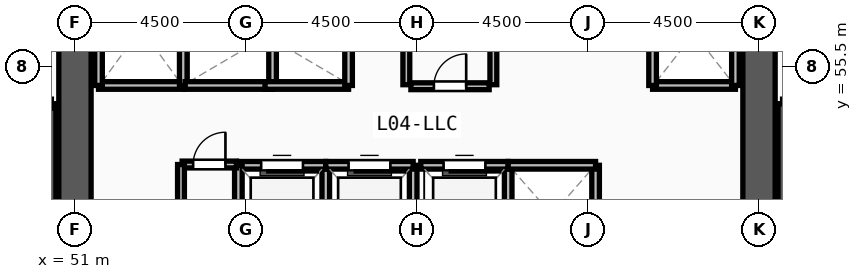
"""IFC4 building model, lengths in metres.
Left out: names, types, materials, properties, quantities, classifications, styles, units other than length and angle.
Written with IfcOpenShell. Run it as: python <this file> out.ifc"""

import sys

from ifc_helpers import new_model, si_unit, direction, frame, frame_2d, origin, place, context, subcontext, project, spatial, rectangle, extrude, source, transform, mapped, element, fill, save


model = new_model("IFC4")
c1 = context("Model", 3, precision=1e-05, world=origin(), true_north=direction((0.0, 1.0)))
c2 = subcontext(c1, "Body", "Model", "MODEL_VIEW")
j1 = project(units=[si_unit("LENGTHUNIT", "METRE"), si_unit("PLANEANGLEUNIT", "RADIAN")], contexts=[c1])
p1 = place(None, origin())
s1 = spatial("IfcSite", under=j1, at=p1, CompositionType="ELEMENT")
p2 = place(p1, origin())
s2 = spatial("IfcBuilding", under=s1, at=p2, CompositionType="ELEMENT")
p3 = place(p2, frame((0.0, 0.0, 14.4)))
s3 = spatial("IfcBuildingStorey", under=s2, at=p3, CompositionType="ELEMENT", Elevation=14.4)
p4 = place(p3, frame((69.0, 60.6, 0.0), z_axis=(0.0, 0.0, 1.0), x_axis=(0.0, -1.0, 0.0)))
e1 = element("IfcWall", 1, at=p4, inside=s3, PredefinedType="SHEAR", context=c2, shape_type="SweptSolid", body=[
    extrude(rectangle(XDim=13.2, YDim=0.85, at=frame_2d((6.6, 0.0))), origin(), (0.0, 0.0, 1.0), 4.25),
])
m1 = source(origin(), c2, "Body", "SweptSolid", [
    extrude(rectangle(XDim=1.2, YDim=2.2, at=frame_2d((0.6, 1.1))), frame((0.0, 0.435, 0.0), z_axis=(0.0, -1.0, 0.0), x_axis=(1.0, 0.0, 0.0)), (0.0, 0.0, 1.0), 0.87),
])
p5 = place(p4, frame((1.05, 0.0, 0.0)))
e2 = element("IfcOpeningElement", 2, at=p5, cuts=e1, PredefinedType="OPENING", context=c2, shape_type="MappedRepresentation", body=[
    mapped(m1, transform((0.0, 0.0, 0.0), x_axis=(1.0, 0.0, 0.0), y_axis=(0.0, 1.0, 0.0), z_axis=(0.0, 0.0, 1.0), scale=1.0)),
])
p6 = place(p3, frame((51.0, 47.4, 0.0), z_axis=(0.0, 0.0, 1.0), x_axis=(0.0, 1.0, 0.0)))
e3 = element("IfcWall", 3, at=p6, inside=s3, PredefinedType="SHEAR", context=c2, shape_type="SweptSolid", body=[
    extrude(rectangle(XDim=13.2, YDim=0.85, at=frame_2d((6.6, 0.0))), origin(), (0.0, 0.0, 1.0), 4.25),
])
for number, where, z_axis, x_axis in (
    (4, (50.38, 46.7, 0.0), (0.0, 0.0, 1.0), (0.0, 1.0, 0.0)),
    (5, (69.62, 54.52, 0.0), (0.0, 0.0, 1.0), (0.0, -1.0, 0.0)),
):
    element("IfcWall", number, at=place(p3, frame(where, z_axis=z_axis, x_axis=x_axis)), inside=s3, PredefinedType="SOLIDWALL", context=c2, shape_type="SweptSolid", body=[
        extrude(rectangle(XDim=7.82, YDim=0.24, at=frame_2d((3.91, 0.0))), origin(), (0.0, 0.0, 1.0), 4.25),
    ])
p7 = place(p3, frame((51.62, 55.0, 0.0), z_axis=(0.0, 0.0, 1.0), x_axis=(1.0, 0.0, 0.0)))
e6 = element("IfcWall", 6, at=p7, inside=s3, PredefinedType="SOLIDWALL", context=c2, shape_type="SweptSolid", body=[
    extrude(rectangle(XDim=2.23, YDim=0.2, at=frame_2d((1.115, 0.0))), origin(), (0.0, 0.0, 1.0), 4.25),
])
for number, where, z_axis, x_axis in (
    (7, (53.85, 55.0, 0.0), (0.0, 0.0, 1.0), (0.0, 1.0, 0.0)),
    (8, (51.62, 58.0, 0.0), (0.0, 0.0, 1.0), (0.0, -1.0, 0.0)),
):
    element("IfcWall", number, at=place(p3, frame(where, z_axis=z_axis, x_axis=x_axis)), inside=s3, PredefinedType="SOLIDWALL", context=c2, shape_type="SweptSolid", body=[
        extrude(rectangle(XDim=3.0, YDim=0.2, at=frame_2d((1.5, 0.0))), origin(), (0.0, 0.0, 1.0), 4.25),
    ])
p8 = place(p3, frame((66.2, 55.0, 0.0), z_axis=(0.0, 0.0, 1.0), x_axis=(1.0, 0.0, 0.0)))
e9 = element("IfcWall", 9, at=p8, inside=s3, PredefinedType="SOLIDWALL", context=c2, shape_type="SweptSolid", body=[
    extrude(rectangle(XDim=2.18, YDim=0.2, at=frame_2d((1.09, 0.0))), origin(), (0.0, 0.0, 1.0), 4.25),
])
for number, where, z_axis, x_axis in (
    (10, (68.38, 55.0, 0.0), (0.0, 0.0, 1.0), (0.0, 1.0, 0.0)),
    (11, (66.2, 57.75, 0.0), (0.0, 0.0, 1.0), (0.0, -1.0, 0.0)),
):
    element("IfcWall", number, at=place(p3, frame(where, z_axis=z_axis, x_axis=x_axis)), inside=s3, PredefinedType="SOLIDWALL", context=c2, shape_type="SweptSolid", body=[
        extrude(rectangle(XDim=2.75, YDim=0.2, at=frame_2d((1.375, 0.0))), origin(), (0.0, 0.0, 1.0), 4.25),
    ])
p9 = place(p3, frame((57.6, 50.3, 0.0), z_axis=(0.0, 0.0, 1.0), x_axis=(0.0, 1.0, 0.0)))
e12 = element("IfcWall", 12, at=p9, inside=s3, PredefinedType="SOLIDWALL", context=c2, shape_type="SweptSolid", body=[
    extrude(rectangle(XDim=2.6, YDim=0.2, at=frame_2d((1.3, 0.0))), origin(), (0.0, 0.0, 1.0), 4.25),
])
p10 = place(p3, frame((57.6, 52.9, 0.0), z_axis=(0.0, 0.0, 1.0), x_axis=(-1.0, 0.0, 0.0)))
e13 = element("IfcWall", 13, at=p10, inside=s3, PredefinedType="SOLIDWALL", context=c2, shape_type="SweptSolid", body=[
    extrude(rectangle(XDim=2.3, YDim=0.2, at=frame_2d((1.15, 0.0))), origin(), (0.0, 0.0, 1.0), 4.25),
])
m2 = source(origin(), c2, "Body", "SweptSolid", [
    extrude(rectangle(XDim=1.1, YDim=2.2, at=frame_2d((0.55, 1.1))), frame((0.0, 0.11, 0.0), z_axis=(0.0, -1.0, 0.0), x_axis=(1.0, 0.0, 0.0)), (0.0, 0.0, 1.0), 0.22),
])
p11 = place(p10, frame((0.6, 0.0, 0.0)))
e14 = element("IfcOpeningElement", 14, at=p11, cuts=e13, PredefinedType="OPENING", context=c2, shape_type="MappedRepresentation", body=[
    mapped(m2, transform((0.0, 0.0, 0.0), x_axis=(1.0, 0.0, 0.0), y_axis=(0.0, 1.0, 0.0), z_axis=(0.0, 0.0, 1.0), scale=1.0)),
])
for number, where, z_axis, x_axis in (
    (15, (55.3, 52.9, 0.0), (0.0, 0.0, 1.0), (0.0, -1.0, 0.0)),
    (16, (59.9, 50.3, 0.0), (0.0, 0.0, 1.0), (0.0, 1.0, 0.0)),
):
    element("IfcWall", number, at=place(p3, frame(where, z_axis=z_axis, x_axis=x_axis)), inside=s3, PredefinedType="SOLIDWALL", context=c2, shape_type="SweptSolid", body=[
        extrude(rectangle(XDim=2.6, YDim=0.2, at=frame_2d((1.3, 0.0))), origin(), (0.0, 0.0, 1.0), 4.25),
    ])
p12 = place(p3, frame((59.9, 52.9, 0.0), z_axis=(0.0, 0.0, 1.0), x_axis=(-1.0, 0.0, 0.0)))
e17 = element("IfcWall", 17, at=p12, inside=s3, PredefinedType="SOLIDWALL", context=c2, shape_type="SweptSolid", body=[
    extrude(rectangle(XDim=2.3, YDim=0.2, at=frame_2d((1.15, 0.0))), origin(), (0.0, 0.0, 1.0), 4.25),
])
p13 = place(p12, frame((0.6, 0.0, 0.0)))
e18 = element("IfcOpeningElement", 18, at=p13, cuts=e17, PredefinedType="OPENING", context=c2, shape_type="MappedRepresentation", body=[
    mapped(m2, transform((0.0, 0.0, 0.0), x_axis=(1.0, 0.0, 0.0), y_axis=(0.0, 1.0, 0.0), z_axis=(0.0, 0.0, 1.0), scale=1.0)),
])
p14 = place(p3, frame((62.4, 50.3, 0.0), z_axis=(0.0, 0.0, 1.0), x_axis=(0.0, 1.0, 0.0)))
e19 = element("IfcWall", 19, at=p14, inside=s3, PredefinedType="SOLIDWALL", context=c2, shape_type="SweptSolid", body=[
    extrude(rectangle(XDim=2.6, YDim=0.2, at=frame_2d((1.3, 0.0))), origin(), (0.0, 0.0, 1.0), 4.25),
])
p15 = place(p3, frame((62.4, 52.9, 0.0), z_axis=(0.0, 0.0, 1.0), x_axis=(-1.0, 0.0, 0.0)))
e20 = element("IfcWall", 20, at=p15, inside=s3, PredefinedType="SOLIDWALL", context=c2, shape_type="SweptSolid", body=[
    extrude(rectangle(XDim=2.3, YDim=0.2, at=frame_2d((1.15, 0.0))), origin(), (0.0, 0.0, 1.0), 4.25),
])
p16 = place(p15, frame((0.6, 0.0, 0.0)))
e21 = element("IfcOpeningElement", 21, at=p16, cuts=e20, PredefinedType="OPENING", context=c2, shape_type="MappedRepresentation", body=[
    mapped(m2, transform((0.0, 0.0, 0.0), x_axis=(1.0, 0.0, 0.0), y_axis=(0.0, 1.0, 0.0), z_axis=(0.0, 0.0, 1.0), scale=1.0)),
])
p17 = place(p3, frame((64.7, 50.3, 0.0), z_axis=(0.0, 0.0, 1.0), x_axis=(0.0, 1.0, 0.0)))
e22 = element("IfcWall", 22, at=p17, inside=s3, PredefinedType="SOLIDWALL", context=c2, shape_type="SweptSolid", body=[
    extrude(rectangle(XDim=2.6, YDim=0.2, at=frame_2d((1.3, 0.0))), origin(), (0.0, 0.0, 1.0), 4.25),
])
for number, where, z_axis, x_axis in (
    (23, (64.7, 52.9, 0.0), (0.0, 0.0, 1.0), (-1.0, 0.0, 0.0)),
    (24, (53.9, 55.0, 0.0), (0.0, 0.0, 1.0), (1.0, 0.0, 0.0)),
):
    element("IfcWall", number, at=place(p3, frame(where, z_axis=z_axis, x_axis=x_axis)), inside=s3, PredefinedType="SOLIDWALL", context=c2, shape_type="SweptSolid", body=[
        extrude(rectangle(XDim=2.3, YDim=0.2, at=frame_2d((1.15, 0.0))), origin(), (0.0, 0.0, 1.0), 4.25),
    ])
p18 = place(p3, frame((56.2, 55.0, 0.0), z_axis=(0.0, 0.0, 1.0), x_axis=(0.0, 1.0, 0.0)))
e25 = element("IfcWall", 25, at=p18, inside=s3, PredefinedType="SOLIDWALL", context=c2, shape_type="SweptSolid", body=[
    extrude(rectangle(XDim=2.6, YDim=0.2, at=frame_2d((1.3, 0.0))), origin(), (0.0, 0.0, 1.0), 4.25),
])
p19 = place(p3, frame((56.0, 55.0, 0.0), z_axis=(0.0, 0.0, 1.0), x_axis=(1.0, 0.0, 0.0)))
e26 = element("IfcWall", 26, at=p19, inside=s3, PredefinedType="SOLIDWALL", context=c2, shape_type="SweptSolid", body=[
    extrude(rectangle(XDim=2.2, YDim=0.2, at=frame_2d((1.1, 0.0))), origin(), (0.0, 0.0, 1.0), 4.25),
])
p20 = place(p3, frame((58.2, 55.0, 0.0), z_axis=(0.0, 0.0, 1.0), x_axis=(0.0, 1.0, 0.0)))
e27 = element("IfcWall", 27, at=p20, inside=s3, PredefinedType="SOLIDWALL", context=c2, shape_type="SweptSolid", body=[
    extrude(rectangle(XDim=2.6, YDim=0.2, at=frame_2d((1.3, 0.0))), origin(), (0.0, 0.0, 1.0), 4.25),
])
p21 = place(p3, frame((59.84, 54.98, 0.0), z_axis=(0.0, 0.0, 1.0), x_axis=(1.0, 0.0, 0.0)))
e28 = element("IfcWall", 28, at=p21, inside=s3, PredefinedType="PARTITIONING", context=c2, shape_type="SweptSolid", body=[
    extrude(rectangle(XDim=2.06, YDim=0.18, at=frame_2d((1.03, 0.0))), origin(), (0.0, 0.0, 1.0), 4.25),
])
m3 = source(origin(), c2, "Body", "SweptSolid", [
    extrude(rectangle(XDim=0.85, YDim=2.1, at=frame_2d((0.425, 1.05))), frame((0.0, 0.1, 0.0), z_axis=(0.0, -1.0, 0.0), x_axis=(1.0, 0.0, 0.0)), (0.0, 0.0, 1.0), 0.2),
])
p22 = place(p21, frame((0.605, 0.0, 0.0)))
e29 = element("IfcOpeningElement", 29, at=p22, cuts=e28, PredefinedType="OPENING", context=c2, shape_type="MappedRepresentation", body=[
    mapped(m3, transform((0.0, 0.0, 0.0), x_axis=(1.0, 0.0, 0.0), y_axis=(0.0, 1.0, 0.0), z_axis=(0.0, 0.0, 1.0), scale=1.0)),
])
p23 = place(p3, frame((53.82, 52.92, 0.0), z_axis=(0.0, 0.0, 1.0), x_axis=(1.0, 0.0, 0.0)))
e30 = element("IfcWall", 30, at=p23, inside=s3, PredefinedType="PARTITIONING", context=c2, shape_type="SweptSolid", body=[
    extrude(rectangle(XDim=1.43, YDim=0.18, at=frame_2d((0.715, 0.0))), origin(), (0.0, 0.0, 1.0), 4.25),
])
p24 = place(p23, frame((0.29, 0.0, 0.0)))
e31 = element("IfcOpeningElement", 31, at=p24, cuts=e30, PredefinedType="OPENING", context=c2, shape_type="MappedRepresentation", body=[
    mapped(m3, transform((0.0, 0.0, 0.0), x_axis=(1.0, 0.0, 0.0), y_axis=(0.0, 1.0, 0.0), z_axis=(0.0, 0.0, 1.0), scale=1.0)),
])
for number, where, z_axis, x_axis in (
    (32, (59.72, 55.02, 0.0), (0.0, 0.0, 1.0), (0.0, 1.0, 0.0)),
    (33, (62.01, 55.02, 0.0), (0.0, 0.0, 1.0), (0.0, 1.0, 0.0)),
):
    element("IfcWall", number, at=place(p3, frame(where, z_axis=z_axis, x_axis=x_axis)), inside=s3, PredefinedType="PARTITIONING", context=c2, shape_type="SweptSolid", body=[
        extrude(rectangle(XDim=2.88, YDim=0.18, at=frame_2d((1.44, 0.0))), origin(), (0.0, 0.0, 1.0), 4.25),
    ])
p25 = place(p3, frame((53.79, 50.35, 0.0), z_axis=(0.0, 0.0, 1.0), x_axis=(0.0, 1.0, 0.0)))
e34 = element("IfcWall", 34, at=p25, inside=s3, PredefinedType="PARTITIONING", context=c2, shape_type="SweptSolid", body=[
    extrude(rectangle(XDim=2.57, YDim=0.18, at=frame_2d((1.285, 0.0))), origin(), (0.0, 0.0, 1.0), 4.25),
])
m4 = source(origin(), c2, "Body", "SweptSolid", [
    extrude(rectangle(XDim=1.1, YDim=2.2, at=frame_2d((0.55, 1.1))), frame((0.0, 0.025, 0.0), z_axis=(0.0, -1.0, 0.0), x_axis=(1.0, 0.0, 0.0)), (0.0, 0.0, 1.0), 0.05),
])
p26 = place(p11, origin())
e35 = element("IfcDoor", 35, at=p26, inside=s3, OperationType="SLIDING_TO_LEFT", PredefinedType="DOOR", context=c2, shape_type="MappedRepresentation", body=[
    mapped(m4, transform((0.0, 0.0, 0.0), x_axis=(1.0, 0.0, 0.0), y_axis=(0.0, 1.0, 0.0), z_axis=(0.0, 0.0, 1.0), scale=1.0)),
])
fill(e14, e35)
p27 = place(p13, origin())
e36 = element("IfcDoor", 36, at=p27, inside=s3, OperationType="SLIDING_TO_LEFT", PredefinedType="DOOR", context=c2, shape_type="MappedRepresentation", body=[
    mapped(m4, transform((0.0, 0.0, 0.0), x_axis=(1.0, 0.0, 0.0), y_axis=(0.0, 1.0, 0.0), z_axis=(0.0, 0.0, 1.0), scale=1.0)),
])
fill(e18, e36)
p28 = place(p16, origin())
e37 = element("IfcDoor", 37, at=p28, inside=s3, OperationType="SLIDING_TO_LEFT", PredefinedType="DOOR", context=c2, shape_type="MappedRepresentation", body=[
    mapped(m4, transform((0.0, 0.0, 0.0), x_axis=(1.0, 0.0, 0.0), y_axis=(0.0, 1.0, 0.0), z_axis=(0.0, 0.0, 1.0), scale=1.0)),
])
fill(e21, e37)
m5 = source(origin(), c2, "Body", "SweptSolid", [
    extrude(rectangle(XDim=0.85, YDim=2.1, at=frame_2d((0.425, 1.05))), frame((0.0, 0.025, 0.0), z_axis=(0.0, -1.0, 0.0), x_axis=(1.0, 0.0, 0.0)), (0.0, 0.0, 1.0), 0.05),
])
p29 = place(p22, origin())
e38 = element("IfcDoor", 38, at=p29, inside=s3, OperationType="SINGLE_SWING_RIGHT", PredefinedType="DOOR", context=c2, shape_type="MappedRepresentation", body=[
    mapped(m5, transform((0.0, 0.0, 0.0), x_axis=(1.0, 0.0, 0.0), y_axis=(0.0, 1.0, 0.0), z_axis=(0.0, 0.0, 1.0), scale=1.0)),
])
fill(e29, e38)
p30 = place(p24, origin())
e39 = element("IfcDoor", 39, at=p30, inside=s3, OperationType="SINGLE_SWING_RIGHT", PredefinedType="DOOR", context=c2, shape_type="MappedRepresentation", body=[
    mapped(m5, transform((0.0, 0.0, 0.0), x_axis=(1.0, 0.0, 0.0), y_axis=(0.0, 1.0, 0.0), z_axis=(0.0, 0.0, 1.0), scale=1.0)),
])
fill(e31, e39)
save(model, sys.argv[1])
